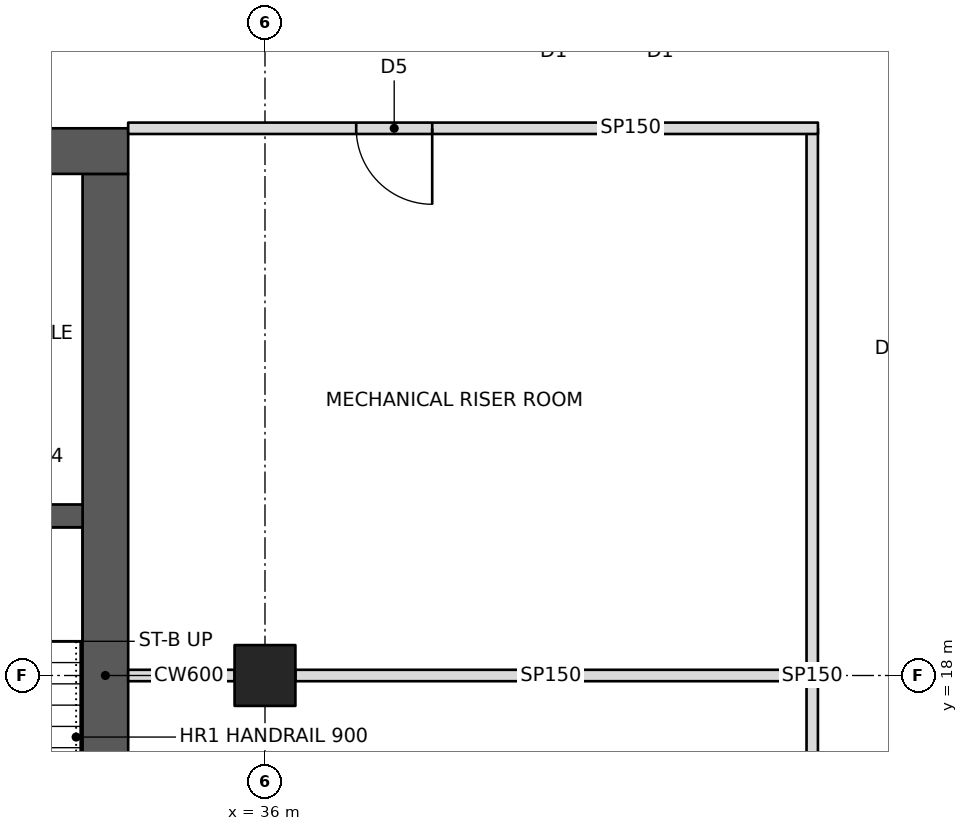
"""IFC4 building model, lengths in metres.
Left out: names, types, materials, properties, quantities, classifications, styles, units other than length and angle.
Written with IfcOpenShell. Run it as: python <this file> out.ifc"""

import sys

from ifc_helpers import new_model, si_unit, direction, frame, frame_2d, origin, origin_2d, place, context, subcontext, project, spatial, rectangle, hollow_rectangle, extrude, element, fill, save


model = new_model("IFC4")
c1 = context("Model", 3, precision=1e-05, world=origin(), true_north=direction((0.0, 1.0)))
c2 = subcontext(c1, "Body", "Model", "MODEL_VIEW")
j1 = project(units=[si_unit("LENGTHUNIT", "METRE"), si_unit("PLANEANGLEUNIT", "RADIAN")], contexts=[c1])
p1 = place(None, origin())
s1 = spatial("IfcSite", under=j1, at=p1, CompositionType="ELEMENT")
p2 = place(p1, origin())
s2 = spatial("IfcBuilding", under=s1, at=p2, CompositionType="ELEMENT")
p3 = place(p2, frame((0.0, 0.0, 82.4)))
s3 = spatial("IfcBuildingStorey", under=s2, at=p3, CompositionType="ELEMENT", Elevation=82.4)
p4 = place(p3, frame((36.0, 18.0, 0.0), z_axis=(0.0, 0.0, 1.0), x_axis=(0.0, 1.0, 0.0)))
e1 = element("IfcColumn", 1, at=p4, inside=s3, PredefinedType="COLUMN", context=c2, shape_type="SweptSolid", body=[
    extrude(hollow_rectangle(XDim=0.8, YDim=0.8, WallThickness=0.09, at=origin_2d()), origin(), (0.0, 0.0, 1.0), 3.4),
])
p5 = place(p3, frame((10.8, 24.9, 0.0), z_axis=(0.0, 0.0, 1.0), x_axis=(1.0, 0.0, 0.0)))
e2 = element("IfcWall", 2, at=p5, inside=s3, PredefinedType="SHEAR", context=c2, shape_type="SweptSolid", body=[
    extrude(rectangle(XDim=23.4, YDim=0.6, at=frame_2d((11.7, 0.0))), origin(), (0.0, 0.0, 1.0), 3.4),
])
p6 = place(p5, frame((17.2, 0.0, 0.0)))
e3 = element("IfcOpeningElement", 3, at=p6, cuts=e2, PredefinedType="OPENING", context=c2, shape_type="SweptSolid", body=[
    extrude(rectangle(XDim=1.8, YDim=2.1, at=frame_2d((0.9, 1.05))), frame((0.0, 0.31, 0.0), z_axis=(0.0, -1.0, 0.0), x_axis=(1.0, 0.0, 0.0)), (0.0, 0.0, 1.0), 0.62),
])
p7 = place(p5, frame((21.1, 0.0, 0.0)))
e4 = element("IfcOpeningElement", 4, at=p7, cuts=e2, PredefinedType="OPENING", context=c2, shape_type="SweptSolid", body=[
    extrude(rectangle(XDim=1.0, YDim=2.1, at=frame_2d((0.5, 1.05))), frame((0.0, 0.31, 0.0), z_axis=(0.0, -1.0, 0.0), x_axis=(1.0, 0.0, 0.0)), (0.0, 0.0, 1.0), 0.62),
])
p8 = place(p3, frame((33.9, 11.4, 0.0), z_axis=(0.0, 0.0, 1.0), x_axis=(0.0, 1.0, 0.0)))
e5 = element("IfcWall", 5, at=p8, inside=s3, PredefinedType="SHEAR", context=c2, shape_type="SweptSolid", body=[
    extrude(rectangle(XDim=13.2, YDim=0.6, at=frame_2d((6.6, 0.0))), origin(), (0.0, 0.0, 1.0), 3.4),
])
p9 = place(p3, frame((30.75, 20.1, 0.0), z_axis=(0.0, 0.0, 1.0), x_axis=(1.0, 0.0, 0.0)))
e6 = element("IfcWall", 6, at=p9, inside=s3, PredefinedType="SHEAR", context=c2, shape_type="SweptSolid", body=[
    extrude(rectangle(XDim=2.85, YDim=0.3, at=frame_2d((1.425, 0.0))), origin(), (0.0, 0.0, 1.0), 3.4),
])
p10 = place(p9, frame((1.15, 0.0, 0.0)))
e7 = element("IfcOpeningElement", 7, at=p10, cuts=e6, PredefinedType="OPENING", context=c2, shape_type="SweptSolid", body=[
    extrude(rectangle(XDim=1.0, YDim=2.1, at=frame_2d((0.5, 1.05))), frame((0.0, 0.16, 0.0), z_axis=(0.0, -1.0, 0.0), x_axis=(1.0, 0.0, 0.0)), (0.0, 0.0, 1.0), 0.32),
])
p11 = place(p3, frame((34.2, 25.2, 0.0), z_axis=(0.0, 0.0, 1.0), x_axis=(1.0, 0.0, 0.0)))
e8 = element("IfcWall", 8, at=p11, inside=s3, PredefinedType="PARTITIONING", context=c2, shape_type="SweptSolid", body=[
    extrude(rectangle(XDim=9.075, YDim=0.15, at=frame_2d((4.538, 0.0))), origin(), (0.0, 0.0, 1.0), 2.404),
])
p12 = place(p11, frame((3.0, 0.0, 0.0)))
e9 = element("IfcOpeningElement", 9, at=p12, cuts=e8, PredefinedType="OPENING", context=c2, shape_type="SweptSolid", body=[
    extrude(rectangle(XDim=1.0, YDim=2.1, at=frame_2d((0.5, 1.05))), frame((0.0, 0.085, 0.0), z_axis=(0.0, -1.0, 0.0), x_axis=(1.0, 0.0, 0.0)), (0.0, 0.0, 1.0), 0.17),
])
p13 = place(p3, frame((43.2, 10.8, 0.0), z_axis=(0.0, 0.0, 1.0), x_axis=(0.0, 1.0, 0.0)))
e10 = element("IfcWall", 10, at=p13, inside=s3, PredefinedType="PARTITIONING", context=c2, shape_type="SweptSolid", body=[
    extrude(rectangle(XDim=14.4, YDim=0.15, at=frame_2d((7.2, 0.0))), origin(), (0.0, 0.0, 1.0), 2.404),
])
p14 = place(p3, frame((34.2, 18.0, 0.0), z_axis=(0.0, 0.0, 1.0), x_axis=(1.0, 0.0, 0.0)))
e11 = element("IfcWall", 11, at=p14, inside=s3, PredefinedType="PARTITIONING", context=c2, shape_type="SweptSolid", body=[
    extrude(rectangle(XDim=1.4, YDim=0.15, at=frame_2d((0.7, 0.0))), origin(), (0.0, 0.0, 1.0), 3.2),
])
p15 = place(p3, frame((36.4, 18.0, 0.0), z_axis=(0.0, 0.0, 1.0), x_axis=(1.0, 0.0, 0.0)))
e12 = element("IfcWall", 12, at=p15, inside=s3, PredefinedType="PARTITIONING", context=c2, shape_type="SweptSolid", body=[
    extrude(rectangle(XDim=6.725, YDim=0.15, at=frame_2d((3.363, 0.0))), origin(), (0.0, 0.0, 1.0), 2.405),
])
p16 = place(p12, frame((1.0, 0.0, 0.0), z_axis=(0.0, 0.0, 1.0), x_axis=(-1.0, 0.0, 0.0)))
e13 = element("IfcDoor", 13, at=p16, inside=s3, OperationType="SINGLE_SWING_LEFT", PredefinedType="DOOR", context=c2, shape_type="SweptSolid", body=[
    extrude(rectangle(XDim=1.0, YDim=2.1, at=frame_2d((0.5, 1.05))), frame((0.0, 0.025, 0.0), z_axis=(0.0, -1.0, 0.0), x_axis=(1.0, 0.0, 0.0)), (0.0, 0.0, 1.0), 0.05),
])
fill(e9, e13)
save(model, sys.argv[1])
